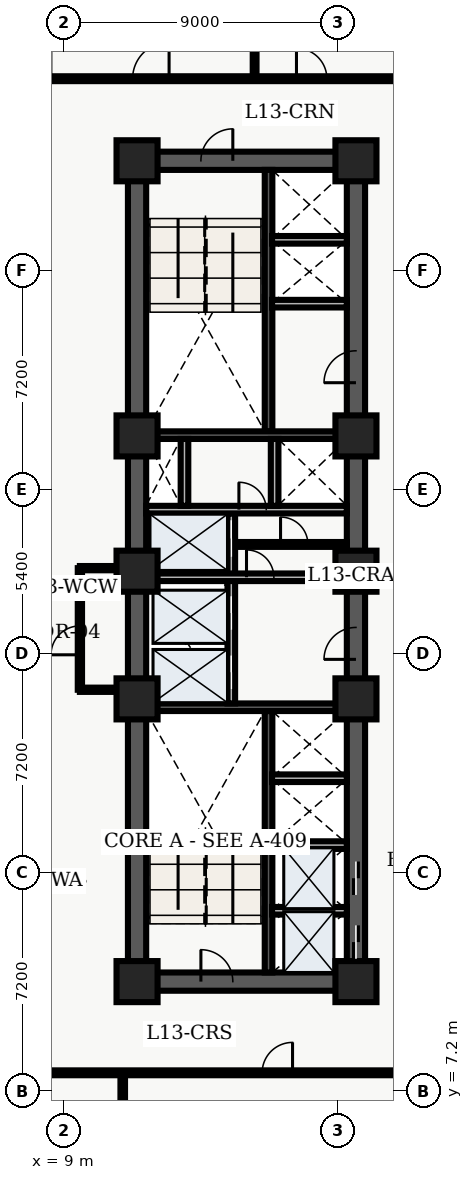
"""IFC4 building model, lengths in metres.
Left out: names, types, materials, properties, quantities, classifications, styles, units other than length and angle.
Written with IfcOpenShell. Run it as: python <this file> out.ifc"""

import sys

from ifc_helpers import new_model, entity, si_unit, converted_unit, direction, frame, origin_with_axes, origin_2d_with_axis, place, context, subcontext, project, spatial, polyline, rectangle, outline, extrude, element, fill, save


model = new_model("IFC4")
c1 = context("Model", 3, precision=1e-05, world=origin_with_axes(), true_north=direction((0.0, 1.0)))
c2 = subcontext(c1, "Body", "Model", "MODEL_VIEW")
j1 = project(units=[si_unit("LENGTHUNIT", "METRE"), converted_unit("PLANEANGLEUNIT", "DEGREE", entity("IfcPlaneAngleMeasure", 0.017), si_unit("PLANEANGLEUNIT", "RADIAN"), dimensions=[0, 0, 0, 0, 0, 0, 0])], contexts=[c1])
p1 = place(None, origin_with_axes())
s1 = spatial("IfcSite", under=j1, at=p1, CompositionType="ELEMENT")
p2 = place(p1, origin_with_axes())
s2 = spatial("IfcBuilding", under=s1, at=p2, CompositionType="ELEMENT")
p3 = place(p2, frame((0.0, 0.0, 56.1), z_axis=(0.0, 0.0, 1.0), x_axis=(1.0, 0.0, 0.0)))
s3 = spatial("IfcBuildingStorey", under=s2, at=p3, CompositionType="ELEMENT", Elevation=56.1)
p4 = place(p3, frame((11.4, 10.8, 0.0), z_axis=(0.0, 0.0, 1.0), x_axis=(0.0, 1.0, 0.0)))
e1 = element("IfcWall", 1, at=p4, inside=s3, PredefinedType="SHEAR", context=c2, shape_type="SweptSolid", body=[
    extrude(outline(polyline([(0.0, -0.3), (27.0, -0.3), (27.0, 0.3), (0.0, 0.3), (0.0, -0.3)])), origin_with_axes(), (0.0, 0.0, 1.0), 3.66),
])
p5 = place(p3, frame((11.4, 10.8, 0.0), z_axis=(0.0, 0.0, 1.0), x_axis=(1.0, 0.0, 0.0)))
e2 = element("IfcWall", 2, at=p5, inside=s3, PredefinedType="SHEAR", context=c2, shape_type="SweptSolid", body=[
    extrude(outline(polyline([(0.0, -0.3), (7.2, -0.3), (7.2, 0.3), (0.0, 0.3), (0.0, -0.3)])), origin_with_axes(), (0.0, 0.0, 1.0), 3.66),
])
p6 = place(p5, frame((2.625, 0.0, 0.0), z_axis=(0.0, 0.0, 1.0), x_axis=(1.0, 0.0, 0.0)))
e3 = element("IfcOpeningElement", 3, at=p6, cuts=e2, PredefinedType="OPENING", context=c2, shape_type="SweptSolid", body=[
    extrude(rectangle(XDim=1.05, YDim=0.62, at=origin_2d_with_axis()), origin_with_axes(), (0.0, 0.0, 1.0), 2.15),
])
p7 = place(p3, frame((11.4, 37.8, 0.0), z_axis=(0.0, 0.0, 1.0), x_axis=(1.0, 0.0, 0.0)))
e4 = element("IfcWall", 4, at=p7, inside=s3, PredefinedType="SHEAR", context=c2, shape_type="SweptSolid", body=[
    extrude(outline(polyline([(0.0, -0.3), (7.2, -0.3), (7.2, 0.3), (0.0, 0.3), (0.0, -0.3)])), origin_with_axes(), (0.0, 0.0, 1.0), 3.66),
])
p8 = place(p7, frame((2.625, 0.0, 0.0), z_axis=(0.0, 0.0, 1.0), x_axis=(1.0, 0.0, 0.0)))
e5 = element("IfcOpeningElement", 5, at=p8, cuts=e4, PredefinedType="OPENING", context=c2, shape_type="SweptSolid", body=[
    extrude(rectangle(XDim=1.05, YDim=0.62, at=origin_2d_with_axis()), origin_with_axes(), (0.0, 0.0, 1.0), 2.15),
])
p9 = place(p3, frame((18.6, 10.8, 0.0), z_axis=(0.0, 0.0, 1.0), x_axis=(0.0, 1.0, 0.0)))
e6 = element("IfcWall", 6, at=p9, inside=s3, PredefinedType="SHEAR", context=c2, shape_type="SweptSolid", body=[
    extrude(outline(polyline([(0.0, -0.3), (13.5, -0.3), (13.5, 0.3), (0.0, 0.3), (0.0, -0.3)])), origin_with_axes(), (0.0, 0.0, 1.0), 3.66),
])
p10 = place(p9, frame((1.3, 0.0, 0.0), z_axis=(0.0, 0.0, 1.0), x_axis=(1.0, 0.0, 0.0)))
e7 = element("IfcOpeningElement", 7, at=p10, cuts=e6, PredefinedType="OPENING", context=c2, shape_type="SweptSolid", body=[
    extrude(rectangle(XDim=1.1, YDim=0.62, at=origin_2d_with_axis()), origin_with_axes(), (0.0, 0.0, 1.0), 2.15),
])
p11 = place(p9, frame((3.4, 0.0, 0.0), z_axis=(0.0, 0.0, 1.0), x_axis=(1.0, 0.0, 0.0)))
e8 = element("IfcOpeningElement", 8, at=p11, cuts=e6, PredefinedType="OPENING", context=c2, shape_type="SweptSolid", body=[
    extrude(rectangle(XDim=1.1, YDim=0.62, at=origin_2d_with_axis()), origin_with_axes(), (0.0, 0.0, 1.0), 2.15),
])
p12 = place(p9, frame((11.125, 0.0, 0.0), z_axis=(0.0, 0.0, 1.0), x_axis=(1.0, 0.0, 0.0)))
e9 = element("IfcOpeningElement", 9, at=p12, cuts=e6, PredefinedType="OPENING", context=c2, shape_type="SweptSolid", body=[
    extrude(rectangle(XDim=1.05, YDim=0.62, at=origin_2d_with_axis()), origin_with_axes(), (0.0, 0.0, 1.0), 2.15),
])
p13 = place(p3, frame((18.6, 24.3, 0.0), z_axis=(0.0, 0.0, 1.0), x_axis=(0.0, 1.0, 0.0)))
e10 = element("IfcWall", 10, at=p13, inside=s3, PredefinedType="SHEAR", context=c2, shape_type="SweptSolid", body=[
    extrude(outline(polyline([(0.0, -0.3), (13.5, -0.3), (13.5, 0.3), (0.0, 0.3), (0.0, -0.3)])), origin_with_axes(), (0.0, 0.0, 1.0), 3.66),
])
p14 = place(p13, frame((6.725, 0.0, 0.0), z_axis=(0.0, 0.0, 1.0), x_axis=(1.0, 0.0, 0.0)))
e11 = element("IfcOpeningElement", 11, at=p14, cuts=e10, PredefinedType="OPENING", context=c2, shape_type="SweptSolid", body=[
    extrude(rectangle(XDim=1.05, YDim=0.62, at=origin_2d_with_axis()), origin_with_axes(), (0.0, 0.0, 1.0), 2.15),
])
p15 = place(p3, frame((15.725, 11.1, 0.0), z_axis=(0.0, 0.0, 1.0), x_axis=(0.0, 1.0, 0.0)))
e12 = element("IfcWall", 12, at=p15, inside=s3, PredefinedType="SHEAR", context=c2, shape_type="SweptSolid", body=[
    extrude(outline(polyline([(0.0, -0.125), (8.6, -0.125), (8.6, 0.125), (0.0, 0.125), (0.0, -0.125)])), origin_with_axes(), (0.0, 0.0, 1.0), 3.66),
])
p16 = place(p3, frame((11.7, 19.825, 0.0), z_axis=(0.0, 0.0, 1.0), x_axis=(1.0, 0.0, 0.0)))
e13 = element("IfcWall", 13, at=p16, inside=s3, PredefinedType="SHEAR", context=c2, shape_type="SweptSolid", body=[
    extrude(outline(polyline([(0.0, -0.125), (6.6, -0.125), (6.6, 0.125), (0.0, 0.125), (0.0, -0.125)])), origin_with_axes(), (0.0, 0.0, 1.0), 3.66),
])
p17 = place(p3, frame((15.725, 28.9, 0.0), z_axis=(0.0, 0.0, 1.0), x_axis=(0.0, 1.0, 0.0)))
e14 = element("IfcWall", 14, at=p17, inside=s3, PredefinedType="SHEAR", context=c2, shape_type="SweptSolid", body=[
    extrude(outline(polyline([(0.0, -0.125), (8.6, -0.125), (8.6, 0.125), (0.0, 0.125), (0.0, -0.125)])), origin_with_axes(), (0.0, 0.0, 1.0), 3.66),
])
p18 = place(p3, frame((11.7, 28.775, 0.0), z_axis=(0.0, 0.0, 1.0), x_axis=(1.0, 0.0, 0.0)))
e15 = element("IfcWall", 15, at=p18, inside=s3, PredefinedType="SHEAR", context=c2, shape_type="SweptSolid", body=[
    extrude(outline(polyline([(0.0, -0.125), (6.6, -0.125), (6.6, 0.125), (0.0, 0.125), (0.0, -0.125)])), origin_with_axes(), (0.0, 0.0, 1.0), 3.66),
])
p19 = place(p3, frame((14.5, 19.95, 0.0), z_axis=(0.0, 0.0, 1.0), x_axis=(0.0, 1.0, 0.0)))
e16 = element("IfcWall", 16, at=p19, inside=s3, PredefinedType="SOLIDWALL", context=c2, shape_type="SweptSolid", body=[
    extrude(outline(polyline([(0.0, -0.125), (6.25, -0.125), (6.25, 0.125), (0.0, 0.125), (0.0, -0.125)])), origin_with_axes(), (0.0, 0.0, 1.0), 2.7),
])
p20 = place(p19, frame((1.025, 0.0, 0.0), z_axis=(0.0, 0.0, 1.0), x_axis=(1.0, 0.0, 0.0)))
e17 = element("IfcOpeningElement", 17, at=p20, cuts=e16, PredefinedType="OPENING", context=c2, shape_type="SweptSolid", body=[
    extrude(rectangle(XDim=1.1, YDim=0.27, at=origin_2d_with_axis()), origin_with_axes(), (0.0, 0.0, 1.0), 2.15),
])
p21 = place(p19, frame((2.975, 0.0, 0.0), z_axis=(0.0, 0.0, 1.0), x_axis=(1.0, 0.0, 0.0)))
e18 = element("IfcOpeningElement", 18, at=p21, cuts=e16, PredefinedType="OPENING", context=c2, shape_type="SweptSolid", body=[
    extrude(rectangle(XDim=1.1, YDim=0.27, at=origin_2d_with_axis()), origin_with_axes(), (0.0, 0.0, 1.0), 2.15),
])
p22 = place(p19, frame((5.425, 0.0, 0.0), z_axis=(0.0, 0.0, 1.0), x_axis=(1.0, 0.0, 0.0)))
e19 = element("IfcOpeningElement", 19, at=p22, cuts=e16, PredefinedType="OPENING", context=c2, shape_type="SweptSolid", body=[
    extrude(rectangle(XDim=1.2, YDim=0.27, at=origin_2d_with_axis()), origin_with_axes(), (0.0, 0.0, 1.0), 2.15),
])
p23 = place(p3, frame((11.7, 24.1, 0.0), z_axis=(0.0, 0.0, 1.0), x_axis=(1.0, 0.0, 0.0)))
e20 = element("IfcWall", 20, at=p23, inside=s3, PredefinedType="SOLIDWALL", context=c2, shape_type="SweptSolid", body=[
    extrude(outline(polyline([(0.0, -0.125), (6.6, -0.125), (6.6, 0.125), (0.0, 0.125), (0.0, -0.125)])), origin_with_axes(), (0.0, 0.0, 1.0), 2.7),
])
p24 = place(p23, frame((3.75, 0.0, 0.0), z_axis=(0.0, 0.0, 1.0), x_axis=(1.0, 0.0, 0.0)))
e21 = element("IfcOpeningElement", 21, at=p24, cuts=e20, PredefinedType="OPENING", context=c2, shape_type="SweptSolid", body=[
    extrude(rectangle(XDim=0.9, YDim=0.27, at=origin_2d_with_axis()), origin_with_axes(), (0.0, 0.0, 1.0), 2.15),
])
p25 = place(p3, frame((11.7, 26.325, 0.0), z_axis=(0.0, 0.0, 1.0), x_axis=(1.0, 0.0, 0.0)))
e22 = element("IfcWall", 22, at=p25, inside=s3, PredefinedType="SOLIDWALL", context=c2, shape_type="SweptSolid", body=[
    extrude(outline(polyline([(0.0, -0.125), (6.6, -0.125), (6.6, 0.125), (0.0, 0.125), (0.0, -0.125)])), origin_with_axes(), (0.0, 0.0, 1.0), 2.7),
])
p26 = place(p25, frame((3.5, 0.0, 0.0), z_axis=(0.0, 0.0, 1.0), x_axis=(1.0, 0.0, 0.0)))
e23 = element("IfcOpeningElement", 23, at=p26, cuts=e22, PredefinedType="OPENING", context=c2, shape_type="SweptSolid", body=[
    extrude(rectangle(XDim=0.9, YDim=0.27, at=origin_2d_with_axis()), origin_with_axes(), (0.0, 0.0, 1.0), 2.15),
])
for number, where, z_axis, x_axis in (
    (24, (12.96, 26.45, 0.0), (0.0, 0.0, 1.0), (0.0, 1.0, 0.0)),
    (25, (15.925, 26.45, 0.0), (0.0, 0.0, 1.0), (0.0, 1.0, 0.0)),
):
    element("IfcWall", number, at=place(p3, frame(where, z_axis=z_axis, x_axis=x_axis)), inside=s3, PredefinedType="SOLIDWALL", context=c2, shape_type="SweptSolid", body=[
        extrude(outline(polyline([(0.0, -0.125), (2.2, -0.125), (2.2, 0.125), (0.0, 0.125), (0.0, -0.125)])), origin_with_axes(), (0.0, 0.0, 1.0), 2.7),
    ])
for number, where, z_axis, x_axis in (
    (26, (11.4, 10.8, 0.0), (0.0, 0.0, 1.0), (1.0, 0.0, 0.0)),
    (27, (11.4, 20.1, 0.0), (0.0, 0.0, 1.0), (1.0, 0.0, 0.0)),
    (28, (11.4, 24.3, 0.0), (0.0, 0.0, 1.0), (1.0, 0.0, 0.0)),
    (29, (11.4, 28.75, 0.0), (0.0, 0.0, 1.0), (1.0, 0.0, 0.0)),
    (30, (11.4, 37.8, 0.0), (0.0, 0.0, 1.0), (1.0, 0.0, 0.0)),
    (31, (18.6, 10.8, 0.0), (0.0, 0.0, 1.0), (1.0, 0.0, 0.0)),
    (32, (18.6, 20.1, 0.0), (0.0, 0.0, 1.0), (1.0, 0.0, 0.0)),
    (33, (18.6, 24.3, 0.0), (0.0, 0.0, 1.0), (1.0, 0.0, 0.0)),
    (34, (18.6, 28.75, 0.0), (0.0, 0.0, 1.0), (1.0, 0.0, 0.0)),
    (35, (18.6, 37.8, 0.0), (0.0, 0.0, 1.0), (1.0, 0.0, 0.0)),
):
    element("IfcColumn", number, at=place(p3, frame(where, z_axis=z_axis, x_axis=x_axis)), inside=s3, PredefinedType="COLUMN", context=c2, shape_type="SweptSolid", body=[
        extrude(rectangle(XDim=1.35, YDim=1.35, at=origin_2d_with_axis()), origin_with_axes(), (0.0, 0.0, 1.0), 3.9),
    ])
p27 = place(p3, frame((14.62, 25.18, 0.0), z_axis=(0.0, 0.0, 1.0), x_axis=(1.0, 0.0, 0.0)))
e36 = element("IfcWall", 36, at=p27, inside=s3, PredefinedType="PARTITIONING", context=c2, shape_type="SweptSolid", body=[
    extrude(outline(polyline([(0.0, -0.08), (3.68, -0.08), (3.68, 0.08), (0.0, 0.08), (0.0, -0.08)])), origin_with_axes(), (0.0, 0.0, 1.0), 2.7),
])
p28 = place(p27, frame((1.95, 0.0, 0.0), z_axis=(0.0, 0.0, 1.0), x_axis=(1.0, 0.0, 0.0)))
e37 = element("IfcOpeningElement", 37, at=p28, cuts=e36, PredefinedType="OPENING", context=c2, shape_type="SweptSolid", body=[
    extrude(rectangle(XDim=0.9, YDim=0.18, at=origin_2d_with_axis()), origin_with_axes(), (0.0, 0.0, 1.0), 2.15),
])
for number, where, z_axis, x_axis in (
    (38, (15.84, 13.13, 0.0), (0.0, 0.0, 1.0), (1.0, 0.0, 0.0)),
    (39, (15.84, 15.29, 0.0), (0.0, 0.0, 1.0), (1.0, 0.0, 0.0)),
    (40, (15.84, 17.49, 0.0), (0.0, 0.0, 1.0), (1.0, 0.0, 0.0)),
    (41, (15.84, 33.1, 0.0), (0.0, 0.0, 1.0), (1.0, 0.0, 0.0)),
    (42, (15.84, 35.2, 0.0), (0.0, 0.0, 1.0), (1.0, 0.0, 0.0)),
):
    element("IfcWall", number, at=place(p3, frame(where, z_axis=z_axis, x_axis=x_axis)), inside=s3, PredefinedType="SOLIDWALL", context=c2, shape_type="SweptSolid", body=[
        extrude(outline(polyline([(0.0, -0.125), (2.46, -0.125), (2.46, 0.125), (0.0, 0.125), (0.0, -0.125)])), origin_with_axes(), (0.0, 0.0, 1.0), 2.7),
    ])
p29 = place(p3, frame((9.52, 20.4, 0.0), z_axis=(0.0, 0.0, 1.0), x_axis=(0.0, 1.0, 0.0)))
e43 = element("IfcWall", 43, at=p29, inside=s3, PredefinedType="PARTITIONING", context=c2, shape_type="SweptSolid", body=[
    extrude(outline(polyline([(0.0, -0.07), (4.0, -0.07), (4.0, 0.07), (0.0, 0.07), (0.0, -0.07)])), origin_with_axes(), (0.0, 0.0, 1.0), 2.7),
])
p30 = place(p29, frame((1.625, 0.0, 0.0), z_axis=(0.0, 0.0, 1.0), x_axis=(1.0, 0.0, 0.0)))
e44 = element("IfcOpeningElement", 44, at=p30, cuts=e43, PredefinedType="OPENING", context=c2, shape_type="SweptSolid", body=[
    extrude(rectangle(XDim=0.95, YDim=0.16, at=origin_2d_with_axis()), origin_with_axes(), (0.0, 0.0, 1.0), 2.15),
])
for number, where, z_axis, x_axis in (
    (45, (9.52, 20.4, 0.0), (0.0, 0.0, 1.0), (1.0, 0.0, 0.0)),
    (46, (9.52, 24.4, 0.0), (0.0, 0.0, 1.0), (1.0, 0.0, 0.0)),
):
    element("IfcWall", number, at=place(p3, frame(where, z_axis=z_axis, x_axis=x_axis)), inside=s3, PredefinedType="PARTITIONING", context=c2, shape_type="SweptSolid", body=[
        extrude(outline(polyline([(0.0, -0.07), (1.58, -0.07), (1.58, 0.07), (0.0, 0.07), (0.0, -0.07)])), origin_with_axes(), (0.0, 0.0, 1.0), 2.7),
    ])
p31 = place(p3, frame((2.6, 7.8, 0.0), z_axis=(0.0, 0.0, 1.0), x_axis=(1.0, 0.0, 0.0)))
e47 = element("IfcWall", 47, at=p31, inside=s3, PredefinedType="PARTITIONING", context=c2, shape_type="SweptSolid", body=[
    extrude(outline(polyline([(0.0, -0.08), (18.55, -0.08), (18.55, 0.08), (0.0, 0.08), (0.0, -0.08)])), origin_with_axes(), (0.0, 0.0, 1.0), 2.7),
])
p32 = place(p31, frame((2.91, 0.0, 0.0), z_axis=(0.0, 0.0, 1.0), x_axis=(1.0, 0.0, 0.0)))
e48 = element("IfcOpeningElement", 48, at=p32, cuts=e47, PredefinedType="OPENING", context=c2, shape_type="SweptSolid", body=[
    extrude(rectangle(XDim=1.2, YDim=0.18, at=origin_2d_with_axis()), origin_with_axes(), (0.0, 0.0, 1.0), 2.2),
])
p33 = place(p31, frame((13.415, 0.0, 0.0), z_axis=(0.0, 0.0, 1.0), x_axis=(1.0, 0.0, 0.0)))
e49 = element("IfcOpeningElement", 49, at=p33, cuts=e47, PredefinedType="OPENING", context=c2, shape_type="SweptSolid", body=[
    extrude(rectangle(XDim=1.0, YDim=0.18, at=origin_2d_with_axis()), origin_with_axes(), (0.0, 0.0, 1.0), 2.15),
])
p34 = place(p3, frame((2.6, 40.5, 0.0), z_axis=(0.0, 0.0, 1.0), x_axis=(1.0, 0.0, 0.0)))
e50 = element("IfcWall", 50, at=p34, inside=s3, PredefinedType="PARTITIONING", context=c2, shape_type="SweptSolid", body=[
    extrude(outline(polyline([(0.0, -0.08), (18.65, -0.08), (18.65, 0.08), (0.0, 0.08), (0.0, -0.08)])), origin_with_axes(), (0.0, 0.0, 1.0), 2.7),
])
p35 = place(p34, frame((2.915, 0.0, 0.0), z_axis=(0.0, 0.0, 1.0), x_axis=(1.0, 0.0, 0.0)))
e51 = element("IfcOpeningElement", 51, at=p35, cuts=e50, PredefinedType="OPENING", context=c2, shape_type="SweptSolid", body=[
    extrude(rectangle(XDim=1.0, YDim=0.18, at=origin_2d_with_axis()), origin_with_axes(), (0.0, 0.0, 1.0), 2.15),
])
p36 = place(p34, frame((9.254, 0.0, 0.0), z_axis=(0.0, 0.0, 1.0), x_axis=(1.0, 0.0, 0.0)))
e52 = element("IfcOpeningElement", 52, at=p36, cuts=e50, PredefinedType="OPENING", context=c2, shape_type="SweptSolid", body=[
    extrude(rectangle(XDim=1.2, YDim=0.18, at=origin_2d_with_axis()), origin_with_axes(), (0.0, 0.0, 1.0), 2.2),
])
p37 = place(p34, frame((14.543, 0.0, 0.0), z_axis=(0.0, 0.0, 1.0), x_axis=(1.0, 0.0, 0.0)))
e53 = element("IfcOpeningElement", 53, at=p37, cuts=e50, PredefinedType="OPENING", context=c2, shape_type="SweptSolid", body=[
    extrude(rectangle(XDim=1.0, YDim=0.18, at=origin_2d_with_axis()), origin_with_axes(), (0.0, 0.0, 1.0), 2.15),
])
p38 = place(p3, frame((10.929, 0.36, 0.0), z_axis=(0.0, 0.0, 1.0), x_axis=(0.0, 1.0, 0.0)))
e54 = element("IfcWall", 54, at=p38, inside=s3, PredefinedType="PARTITIONING", context=c2, shape_type="SweptSolid", body=[
    extrude(outline(polyline([(0.0, -0.075), (7.34, -0.075), (7.34, 0.075), (0.0, 0.075), (0.0, -0.075)])), origin_with_axes(), (0.0, 0.0, 1.0), 2.7),
])
p39 = place(p3, frame((15.267, 40.6, 0.0), z_axis=(0.0, 0.0, 1.0), x_axis=(0.0, 1.0, 0.0)))
e55 = element("IfcWall", 55, at=p39, inside=s3, PredefinedType="PARTITIONING", context=c2, shape_type="SweptSolid", body=[
    extrude(outline(polyline([(0.0, -0.062), (7.64, -0.062), (7.64, 0.062), (0.0, 0.062), (0.0, -0.062)])), origin_with_axes(), (0.0, 0.0, 1.0), 2.7),
])
p40 = place(p9, frame((1.3, 0.0, 0.0), z_axis=(0.0, 0.0, 1.0), x_axis=(1.0, 0.0, 0.0)))
e56 = element("IfcDoor", 56, at=p40, inside=s3, OperationType="SLIDING_TO_LEFT", PredefinedType="DOOR", context=c2, shape_type="SweptSolid", body=[
    extrude(rectangle(XDim=1.1, YDim=0.09, at=origin_2d_with_axis()), origin_with_axes(), (0.0, 0.0, 1.0), 2.15),
])
fill(e7, e56)
p41 = place(p9, frame((3.4, 0.0, 0.0), z_axis=(0.0, 0.0, 1.0), x_axis=(1.0, 0.0, 0.0)))
e57 = element("IfcDoor", 57, at=p41, inside=s3, OperationType="SLIDING_TO_RIGHT", PredefinedType="DOOR", context=c2, shape_type="SweptSolid", body=[
    extrude(rectangle(XDim=1.1, YDim=0.09, at=origin_2d_with_axis()), origin_with_axes(), (0.0, 0.0, 1.0), 2.15),
])
fill(e8, e57)
p42 = place(p19, frame((1.025, 0.0, 0.0), z_axis=(0.0, 0.0, 1.0), x_axis=(1.0, 0.0, 0.0)))
e58 = element("IfcDoor", 58, at=p42, inside=s3, OperationType="SLIDING_TO_LEFT", PredefinedType="DOOR", context=c2, shape_type="SweptSolid", body=[
    extrude(rectangle(XDim=1.1, YDim=0.09, at=origin_2d_with_axis()), origin_with_axes(), (0.0, 0.0, 1.0), 2.15),
])
fill(e17, e58)
p43 = place(p19, frame((2.975, 0.0, 0.0), z_axis=(0.0, 0.0, 1.0), x_axis=(1.0, 0.0, 0.0)))
e59 = element("IfcDoor", 59, at=p43, inside=s3, OperationType="SLIDING_TO_RIGHT", PredefinedType="DOOR", context=c2, shape_type="SweptSolid", body=[
    extrude(rectangle(XDim=1.1, YDim=0.09, at=origin_2d_with_axis()), origin_with_axes(), (0.0, 0.0, 1.0), 2.15),
])
fill(e18, e59)
p44 = place(p19, frame((5.425, 0.0, 0.0), z_axis=(0.0, 0.0, 1.0), x_axis=(1.0, 0.0, 0.0)))
e60 = element("IfcDoor", 60, at=p44, inside=s3, OperationType="DOUBLE_DOOR_SLIDING", PredefinedType="DOOR", context=c2, shape_type="SweptSolid", body=[
    extrude(rectangle(XDim=1.2, YDim=0.09, at=origin_2d_with_axis()), origin_with_axes(), (0.0, 0.0, 1.0), 2.15),
])
fill(e19, e60)
p45 = place(p5, frame((2.625, 0.0, 0.0), z_axis=(0.0, 0.0, 1.0), x_axis=(1.0, 0.0, 0.0)))
e61 = element("IfcDoor", 61, at=p45, inside=s3, OperationType="SINGLE_SWING_LEFT", PredefinedType="DOOR", context=c2, shape_type="SweptSolid", body=[
    extrude(rectangle(XDim=1.05, YDim=0.09, at=origin_2d_with_axis()), origin_with_axes(), (0.0, 0.0, 1.0), 2.15),
])
fill(e3, e61)
p46 = place(p7, frame((2.625, 0.0, 0.0), z_axis=(0.0, 0.0, 1.0), x_axis=(1.0, 0.0, 0.0)))
e62 = element("IfcDoor", 62, at=p46, inside=s3, OperationType="SINGLE_SWING_RIGHT", PredefinedType="DOOR", context=c2, shape_type="SweptSolid", body=[
    extrude(rectangle(XDim=1.05, YDim=0.09, at=origin_2d_with_axis()), origin_with_axes(), (0.0, 0.0, 1.0), 2.15),
])
fill(e5, e62)
p47 = place(p9, frame((11.125, 0.0, 0.0), z_axis=(0.0, 0.0, 1.0), x_axis=(1.0, 0.0, 0.0)))
e63 = element("IfcDoor", 63, at=p47, inside=s3, OperationType="SINGLE_SWING_LEFT", PredefinedType="DOOR", context=c2, shape_type="SweptSolid", body=[
    extrude(rectangle(XDim=1.05, YDim=0.09, at=origin_2d_with_axis()), origin_with_axes(), (0.0, 0.0, 1.0), 2.15),
])
fill(e9, e63)
p48 = place(p25, frame((3.5, 0.0, 0.0), z_axis=(0.0, 0.0, 1.0), x_axis=(1.0, 0.0, 0.0)))
e64 = element("IfcDoor", 64, at=p48, inside=s3, OperationType="SINGLE_SWING_LEFT", PredefinedType="DOOR", context=c2, shape_type="SweptSolid", body=[
    extrude(rectangle(XDim=0.9, YDim=0.09, at=origin_2d_with_axis()), origin_with_axes(), (0.0, 0.0, 1.0), 2.15),
])
fill(e23, e64)
p49 = place(p23, frame((3.75, 0.0, 0.0), z_axis=(0.0, 0.0, 1.0), x_axis=(1.0, 0.0, 0.0)))
e65 = element("IfcDoor", 65, at=p49, inside=s3, OperationType="SINGLE_SWING_LEFT", PredefinedType="DOOR", context=c2, shape_type="SweptSolid", body=[
    extrude(rectangle(XDim=0.9, YDim=0.09, at=origin_2d_with_axis()), origin_with_axes(), (0.0, 0.0, 1.0), 2.15),
])
fill(e21, e65)
p50 = place(p27, frame((1.95, 0.0, 0.0), z_axis=(0.0, 0.0, 1.0), x_axis=(1.0, 0.0, 0.0)))
e66 = element("IfcDoor", 66, at=p50, inside=s3, OperationType="SINGLE_SWING_LEFT", PredefinedType="DOOR", context=c2, shape_type="SweptSolid", body=[
    extrude(rectangle(XDim=0.9, YDim=0.09, at=origin_2d_with_axis()), origin_with_axes(), (0.0, 0.0, 1.0), 2.15),
])
fill(e37, e66)
p51 = place(p13, frame((6.725, 0.0, 0.0), z_axis=(0.0, 0.0, 1.0), x_axis=(1.0, 0.0, 0.0)))
e67 = element("IfcDoor", 67, at=p51, inside=s3, OperationType="SINGLE_SWING_LEFT", PredefinedType="DOOR", context=c2, shape_type="SweptSolid", body=[
    extrude(rectangle(XDim=1.05, YDim=0.09, at=origin_2d_with_axis()), origin_with_axes(), (0.0, 0.0, 1.0), 2.15),
])
fill(e11, e67)
p52 = place(p29, frame((1.625, 0.0, 0.0), z_axis=(0.0, 0.0, 1.0), x_axis=(1.0, 0.0, 0.0)))
e68 = element("IfcDoor", 68, at=p52, inside=s3, OperationType="SINGLE_SWING_LEFT", PredefinedType="DOOR", context=c2, shape_type="SweptSolid", body=[
    extrude(rectangle(XDim=0.95, YDim=0.084, at=origin_2d_with_axis()), origin_with_axes(), (0.0, 0.0, 1.0), 2.15),
])
fill(e44, e68)
p53 = place(p31, frame((13.415, 0.0, 0.0), z_axis=(0.0, 0.0, 1.0), x_axis=(1.0, 0.0, 0.0)))
e69 = element("IfcDoor", 69, at=p53, inside=s3, OperationType="SINGLE_SWING_RIGHT", PredefinedType="DOOR", context=c2, shape_type="SweptSolid", body=[
    extrude(rectangle(XDim=1.0, YDim=0.09, at=origin_2d_with_axis()), origin_with_axes(), (0.0, 0.0, 1.0), 2.15),
])
fill(e49, e69)
p54 = place(p34, frame((9.254, 0.0, 0.0), z_axis=(0.0, 0.0, 1.0), x_axis=(1.0, 0.0, 0.0)))
e70 = element("IfcDoor", 70, at=p54, inside=s3, OperationType="SINGLE_SWING_RIGHT", PredefinedType="DOOR", context=c2, shape_type="SweptSolid", body=[
    extrude(rectangle(XDim=1.2, YDim=0.09, at=origin_2d_with_axis()), origin_with_axes(), (0.0, 0.0, 1.0), 2.2),
])
fill(e52, e70)
p55 = place(p34, frame((14.543, 0.0, 0.0), z_axis=(0.0, 0.0, 1.0), x_axis=(1.0, 0.0, 0.0)))
e71 = element("IfcDoor", 71, at=p55, inside=s3, OperationType="SINGLE_SWING_LEFT", PredefinedType="DOOR", context=c2, shape_type="SweptSolid", body=[
    extrude(rectangle(XDim=1.0, YDim=0.09, at=origin_2d_with_axis()), origin_with_axes(), (0.0, 0.0, 1.0), 2.15),
])
fill(e53, e71)
save(model, sys.argv[1])
